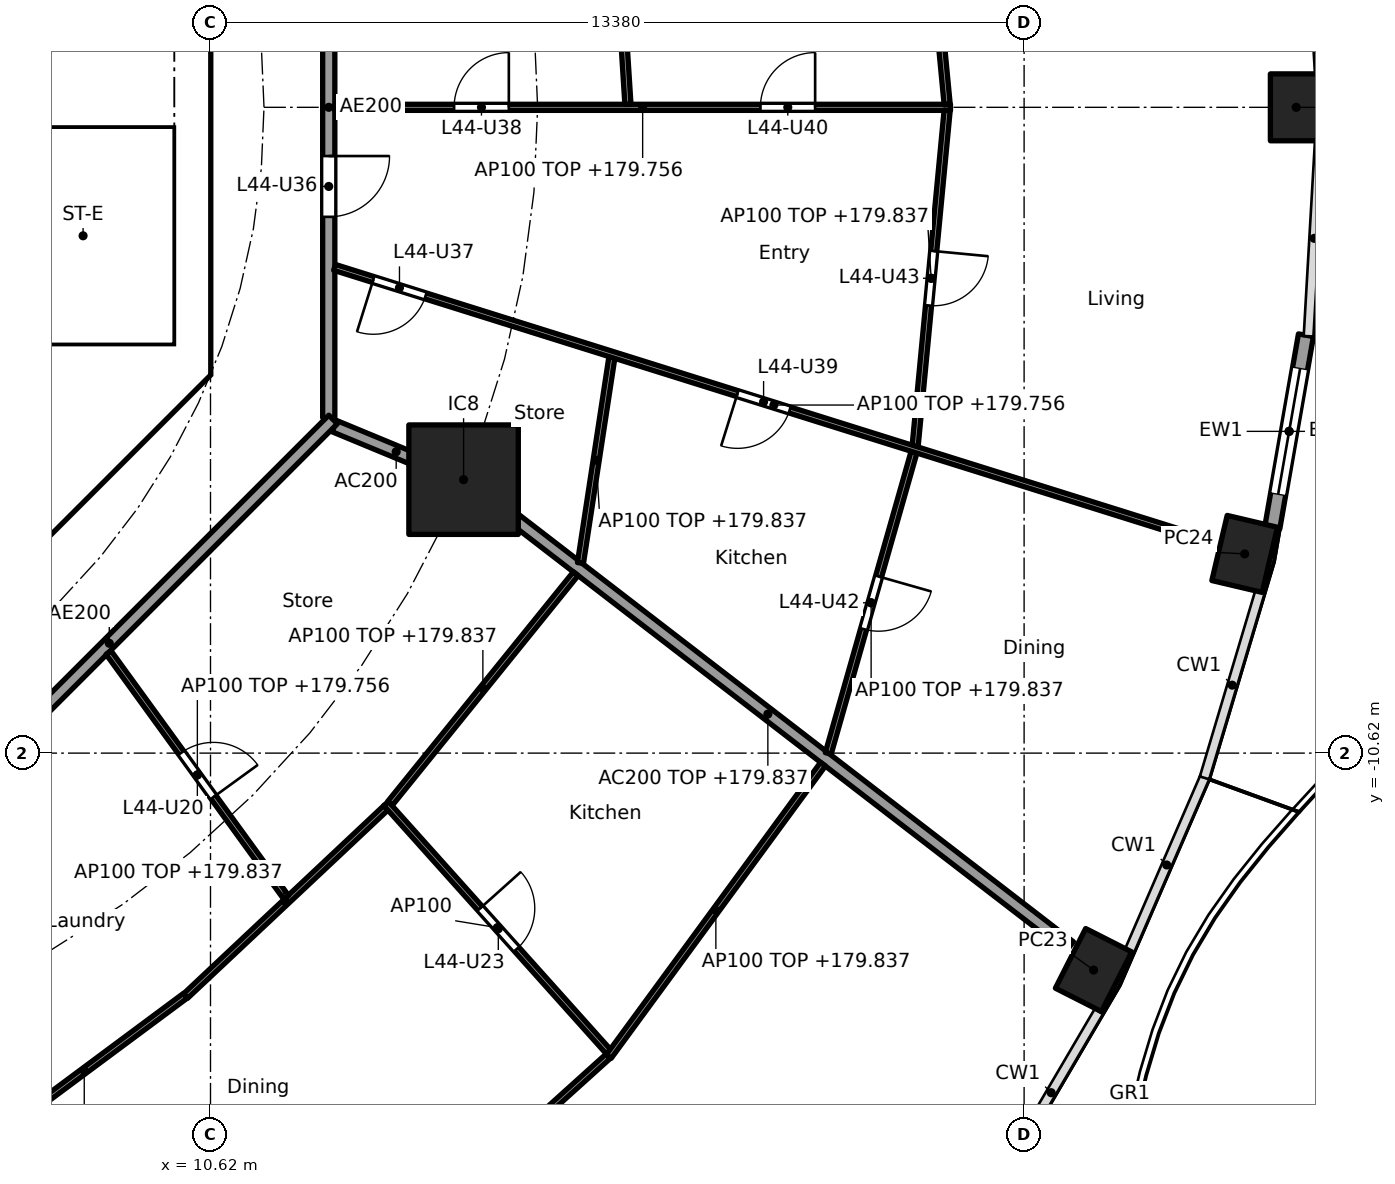
"""IFC4 building model, lengths in metres.
Left out: names, types, materials, properties, quantities, classifications, styles, units other than length and angle.
Written with IfcOpenShell. Run it as: python <this file> out.ifc"""

import sys

from ifc_helpers import new_model, si_unit, direction, frame, frame_2d, origin, origin_2d, place, context, subcontext, project, spatial, polyline, rectangle, hollow_rectangle, outline, extrude, element, fill, save


model = new_model("IFC4")
c1 = context("Model", 3, precision=1e-05, world=origin(), true_north=direction((0.0, 1.0)))
c2 = subcontext(c1, "Body", "Model", "MODEL_VIEW")
j1 = project(units=[si_unit("LENGTHUNIT", "METRE"), si_unit("PLANEANGLEUNIT", "RADIAN")], contexts=[c1])
p1 = place(None, origin())
s1 = spatial("IfcSite", under=j1, at=p1, CompositionType="ELEMENT")
p2 = place(p1, origin())
s2 = spatial("IfcBuilding", under=s1, at=p2, CompositionType="ELEMENT")
p3 = place(p2, frame((0.0, 0.0, 177.0)))
s3 = spatial("IfcBuildingStorey", under=s2, at=p3, CompositionType="ELEMENT", Elevation=177.0)
for number, where, z_axis, x_axis in (
    (1, (28.475, 0.0, 0.0), (0.0, 0.0, 1.0), (0.0, 1.0, 0.0)),
    (2, (25.142, -14.188, 0.0), (0.0, 0.0, 1.0), (0.452, 0.892, 0.0)),
    (3, (27.627, -7.344, 0.0), (0.0, 0.0, 1.0), (0.229, 0.973, 0.0)),
):
    element("IfcColumn", number, at=place(p3, frame(where, z_axis=z_axis, x_axis=x_axis)), inside=s3, PredefinedType="COLUMN", context=c2, shape_type="SweptSolid", body=[
        extrude(hollow_rectangle(XDim=1.1, YDim=0.85, WallThickness=0.036, at=origin_2d()), origin(), (0.0, 0.0, 1.0), 3.7),
    ])
p4 = place(p3, frame((14.782, -6.123, 0.0), z_axis=(0.0, 0.0, 1.0), x_axis=(1.0, 0.0, 0.0)))
e4 = element("IfcColumn", 4, at=p4, inside=s3, PredefinedType="COLUMN", context=c2, shape_type="SweptSolid", body=[
    extrude(rectangle(XDim=1.8, YDim=1.8, at=origin_2d()), origin(), (0.0, 0.0, 1.0), 3.7),
])
p5 = place(p3, frame((28.635, -3.747, 0.0), z_axis=(0.0, 0.0, 1.0), x_axis=(-0.172149769468, -0.985070787747, 0.0)))
e5 = element("IfcWall", 5, at=p5, inside=s3, PredefinedType="SOLIDWALL", context=c2, shape_type="SweptSolid", body=[
    extrude(rectangle(XDim=3.211, YDim=0.25, at=frame_2d((1.605, 0.0))), origin(), (0.0, 0.0, 1.0), 3.44),
])
p6 = place(p5, frame((0.555, 0.0, 0.0)))
e6 = element("IfcOpeningElement", 6, at=p6, cuts=e5, PredefinedType="OPENING", context=c2, shape_type="SweptSolid", body=[
    extrude(rectangle(XDim=2.1, YDim=2.4, at=frame_2d((1.05, 1.2))), frame((0.0, 0.135, 0.0), z_axis=(0.0, -1.0, 0.0), x_axis=(1.0, 0.0, 0.0)), (0.0, 0.0, 1.0), 0.27),
])
p7 = place(p3, frame((4.613, -9.988, 0.0), z_axis=(0.0, 0.0, 1.0), x_axis=(0.707106781187, 0.707106781187, 0.0)))
e7 = element("IfcWall", 7, at=p7, inside=s3, PredefinedType="SHEAR", context=c2, shape_type="SweptSolid", body=[
    extrude(rectangle(XDim=7.602, YDim=0.6, at=frame_2d((3.801, 0.0))), origin(), (0.0, 0.0, 1.0), 3.44),
])
p8 = place(p7, frame((3.201, 0.0, 0.0)))
e8 = element("IfcOpeningElement", 8, at=p8, cuts=e7, PredefinedType="OPENING", context=c2, shape_type="SweptSolid", body=[
    extrude(rectangle(XDim=1.2, YDim=2.1, at=frame_2d((0.6, 1.05))), frame((0.0, 0.31, 0.0), z_axis=(0.0, -1.0, 0.0), x_axis=(1.0, 0.0, 0.0)), (0.0, 0.0, 1.0), 0.62),
])
p9 = place(p3, origin())
e9 = element("IfcWall", 9, at=p9, inside=s3, PredefinedType="SHEAR", context=c2, shape_type="SweptSolid", body=[
    extrude(outline(polyline([(9.776, -4.401), (10.025, -4.152), (10.025, -3.801), (10.025, 4.152), (9.776, 4.401), (10.2, 4.825), (10.625, 4.401), (10.625, -4.401), (10.2, -4.825), (9.776, -4.401)])), origin(), (0.0, 0.0, 1.0), 3.44),
])
p10 = place(p3, origin())
e10 = element("IfcWall", 10, at=p10, inside=s3, PredefinedType="SOLIDWALL", context=c2, shape_type="SweptSolid", body=[
    extrude(outline(polyline([(10.025, -4.1), (6.7, -4.1), (6.7, -3.9), (10.025, -3.9), (10.025, -4.1)])), origin(), (0.0, 0.0, 1.0), 3.44),
])
p11 = place(p3, frame((12.657, -5.243, 0.0), z_axis=(0.0, 0.0, 1.0), x_axis=(0.92383017907, -0.382802560388, 0.0)))
e11 = element("IfcWall", 11, at=p11, inside=s3, PredefinedType="PARTITIONING", context=c2, shape_type="SweptSolid", body=[
    extrude(rectangle(XDim=2.2, YDim=0.2, at=frame_2d((1.1, 0.0))), origin(), (0.0, 0.0, 1.0), 3.44),
])
p12 = place(p3, frame((14.822, -6.154, 0.0), z_axis=(0.0, 0.0, 1.0), x_axis=(0.792203056092, -0.610257583254, 0.0)))
e12 = element("IfcWall", 12, at=p12, inside=s3, PredefinedType="PARTITIONING", context=c2, shape_type="SweptSolid", body=[
    extrude(rectangle(XDim=12.533, YDim=0.2, at=frame_2d((6.266, 0.0))), origin(), (0.0, 0.0, 1.0), 2.837),
])
p13 = place(p3, frame((12.565, -5.104, 0.0), z_axis=(0.0, 0.0, 1.0), x_axis=(0.0, 1.0, 0.0)))
e13 = element("IfcWall", 13, at=p13, inside=s3, PredefinedType="PARTITIONING", context=c2, shape_type="SweptSolid", body=[
    extrude(rectangle(XDim=10.209, YDim=0.2, at=frame_2d((5.104, 0.0))), origin(), (0.0, 0.0, 1.0), 3.44),
])
p14 = place(p13, frame((3.303, 0.0, 0.0)))
e14 = element("IfcOpeningElement", 14, at=p14, cuts=e13, PredefinedType="OPENING", context=c2, shape_type="SweptSolid", body=[
    extrude(rectangle(XDim=1.0, YDim=2.1, at=frame_2d((0.5, 1.05))), frame((0.0, 0.11, 0.0), z_axis=(0.0, -1.0, 0.0), x_axis=(1.0, 0.0, 0.0)), (0.0, 0.0, 1.0), 0.22),
])
p15 = place(p3, frame((5.275, -12.494, 0.0), z_axis=(0.0, 0.0, 1.0), x_axis=(0.707106781187, 0.707106781187, 0.0)))
e15 = element("IfcWall", 15, at=p15, inside=s3, PredefinedType="PARTITIONING", context=c2, shape_type="SweptSolid", body=[
    extrude(rectangle(XDim=10.409, YDim=0.2, at=frame_2d((5.205, 0.0))), origin(), (0.0, 0.0, 1.0), 3.44),
])
p16 = place(p3, frame((12.665, 0.0, 0.0), z_axis=(0.0, 0.0, 1.0), x_axis=(1.0, 0.0, 0.0)))
e16 = element("IfcWall", 16, at=p16, inside=s3, PredefinedType="PARTITIONING", context=c2, shape_type="SweptSolid", body=[
    extrude(rectangle(XDim=10.124, YDim=0.1, at=frame_2d((5.062, 0.0))), origin(), (0.0, 0.0, 1.0), 2.756),
])
p17 = place(p16, frame((1.961, 0.0, 0.0)))
e17 = element("IfcOpeningElement", 17, at=p17, cuts=e16, PredefinedType="OPENING", context=c2, shape_type="SweptSolid", body=[
    extrude(rectangle(XDim=0.9, YDim=2.1, at=frame_2d((0.45, 1.05))), frame((0.0, 0.06, 0.0), z_axis=(0.0, -1.0, 0.0), x_axis=(1.0, 0.0, 0.0)), (0.0, 0.0, 1.0), 0.12),
])
p18 = place(p16, frame((6.999, 0.0, 0.0)))
e18 = element("IfcOpeningElement", 18, at=p18, cuts=e16, PredefinedType="OPENING", context=c2, shape_type="SweptSolid", body=[
    extrude(rectangle(XDim=0.9, YDim=2.1, at=frame_2d((0.45, 1.05))), frame((0.0, 0.06, 0.0), z_axis=(0.0, -1.0, 0.0), x_axis=(1.0, 0.0, 0.0)), (0.0, 0.0, 1.0), 0.12),
])
p19 = place(p3, frame((17.485, 0.05, 0.0), z_axis=(0.0, 0.0, 1.0), x_axis=(-0.063673473968, 0.997970785501, 0.0)))
e19 = element("IfcWall", 19, at=p19, inside=s3, PredefinedType="PARTITIONING", context=c2, shape_type="SweptSolid", body=[
    extrude(rectangle(XDim=4.072, YDim=0.1, at=frame_2d((2.036, 0.0))), origin(), (0.0, 0.0, 1.0), 2.837),
])
p20 = place(p19, frame((2.554, 0.0, 0.0)))
e20 = element("IfcOpeningElement", 20, at=p20, cuts=e19, PredefinedType="OPENING", context=c2, shape_type="SweptSolid", body=[
    extrude(rectangle(XDim=0.9, YDim=2.1, at=frame_2d((0.45, 1.05))), frame((0.0, 0.06, 0.0), z_axis=(0.0, -1.0, 0.0), x_axis=(1.0, 0.0, 0.0)), (0.0, 0.0, 1.0), 0.12),
])
p21 = place(p3, frame((22.734, 0.05, 0.0), z_axis=(0.0, 0.0, 1.0), x_axis=(-0.0949274088, 0.995484197292, 0.0)))
e21 = element("IfcWall", 21, at=p21, inside=s3, PredefinedType="PARTITIONING", context=c2, shape_type="SweptSolid", body=[
    extrude(rectangle(XDim=5.648, YDim=0.1, at=frame_2d((2.824, 0.0))), origin(), (0.0, 0.0, 1.0), 2.837),
])
p22 = place(p3, frame((22.734, -0.05, 0.0), z_axis=(0.0, 0.0, 1.0), x_axis=(-0.094923312677, -0.995484587882, 0.0)))
e22 = element("IfcWall", 22, at=p22, inside=s3, PredefinedType="PARTITIONING", context=c2, shape_type="SweptSolid", body=[
    extrude(rectangle(XDim=5.548, YDim=0.1, at=frame_2d((2.774, 0.0))), origin(), (0.0, 0.0, 1.0), 2.837),
])
p23 = place(p22, frame((2.324, 0.0, 0.0)))
e23 = element("IfcOpeningElement", 23, at=p23, cuts=e22, PredefinedType="OPENING", context=c2, shape_type="SweptSolid", body=[
    extrude(rectangle(XDim=0.9, YDim=2.1, at=frame_2d((0.45, 1.05))), frame((0.0, 0.06, 0.0), z_axis=(0.0, -1.0, 0.0), x_axis=(1.0, 0.0, 0.0)), (0.0, 0.0, 1.0), 0.12),
])
p24 = place(p3, frame((6.138, -14.83, 0.0), z_axis=(0.0, 0.0, 1.0), x_axis=(0.294822274121, -0.955552105687, 0.0)))
e24 = element("IfcWall", 24, at=p24, inside=s3, PredefinedType="PARTITIONING", context=c2, shape_type="SweptSolid", body=[
    extrude(rectangle(XDim=7.594, YDim=0.1, at=frame_2d((3.797, 0.0))), origin(), (0.0, 0.0, 1.0), 3.44),
])
p25 = place(p24, frame((1.306, 0.0, 0.0)))
e25 = element("IfcOpeningElement", 25, at=p25, cuts=e24, PredefinedType="OPENING", context=c2, shape_type="SweptSolid", body=[
    extrude(rectangle(XDim=0.9, YDim=2.1, at=frame_2d((0.45, 1.05))), frame((0.0, 0.06, 0.0), z_axis=(0.0, -1.0, 0.0), x_axis=(1.0, 0.0, 0.0)), (0.0, 0.0, 1.0), 0.12),
])
p26 = place(p24, frame((4.515, 0.0, 0.0)))
e26 = element("IfcOpeningElement", 26, at=p26, cuts=e24, PredefinedType="OPENING", context=c2, shape_type="SweptSolid", body=[
    extrude(rectangle(XDim=0.9, YDim=2.1, at=frame_2d((0.45, 1.05))), frame((0.0, 0.06, 0.0), z_axis=(0.0, -1.0, 0.0), x_axis=(1.0, 0.0, 0.0)), (0.0, 0.0, 1.0), 0.12),
])
p27 = place(p3, frame((6.881, -17.08, 0.0), z_axis=(0.0, 0.0, 1.0), x_axis=(0.802784956441, 0.596268659005, 0.0)))
e27 = element("IfcWall", 27, at=p27, inside=s3, PredefinedType="PARTITIONING", context=c2, shape_type="SweptSolid", body=[
    extrude(rectangle(XDim=4.142, YDim=0.1, at=frame_2d((2.071, 0.0))), origin(), (0.0, 0.0, 1.0), 2.837),
])
p28 = place(p3, frame((10.21, -14.614, 0.0), z_axis=(0.0, 0.0, 1.0), x_axis=(0.728883199496, 0.684638066055, 0.0)))
e28 = element("IfcWall", 28, at=p28, inside=s3, PredefinedType="PARTITIONING", context=c2, shape_type="SweptSolid", body=[
    extrude(rectangle(XDim=4.519, YDim=0.1, at=frame_2d((2.26, 0.0))), origin(), (0.0, 0.0, 1.0), 2.837),
])
p29 = place(p3, frame((13.045, -19.313, 0.0), z_axis=(0.0, 0.0, 1.0), x_axis=(0.742790086539, 0.66952437397, 0.0)))
e29 = element("IfcWall", 29, at=p29, inside=s3, PredefinedType="PARTITIONING", context=c2, shape_type="SweptSolid", body=[
    extrude(rectangle(XDim=5.542, YDim=0.1, at=frame_2d((2.771, 0.0))), origin(), (0.0, 0.0, 1.0), 2.837),
])
p30 = place(p29, frame((2.321, 0.0, 0.0)))
e30 = element("IfcOpeningElement", 30, at=p30, cuts=e29, PredefinedType="OPENING", context=c2, shape_type="SweptSolid", body=[
    extrude(rectangle(XDim=0.9, YDim=2.1, at=frame_2d((0.45, 1.05))), frame((0.0, 0.06, 0.0), z_axis=(0.0, -1.0, 0.0), x_axis=(1.0, 0.0, 0.0)), (0.0, 0.0, 1.0), 0.12),
])
p31 = place(p3, frame((8.943, -8.966, 0.0), z_axis=(0.0, 0.0, 1.0), x_axis=(0.587187896734, -0.809450661825, 0.0)))
e31 = element("IfcWall", 31, at=p31, inside=s3, PredefinedType="PARTITIONING", context=c2, shape_type="SweptSolid", body=[
    extrude(rectangle(XDim=4.975, YDim=0.1, at=frame_2d((2.487, 0.0))), origin(), (0.0, 0.0, 1.0), 2.756),
])
p32 = place(p31, frame((2.037, 0.0, 0.0)))
e32 = element("IfcOpeningElement", 32, at=p32, cuts=e31, PredefinedType="OPENING", context=c2, shape_type="SweptSolid", body=[
    extrude(rectangle(XDim=0.9, YDim=2.1, at=frame_2d((0.45, 1.05))), frame((0.0, 0.06, 0.0), z_axis=(0.0, -1.0, 0.0), x_axis=(1.0, 0.0, 0.0)), (0.0, 0.0, 1.0), 0.12),
])
p33 = place(p3, frame((13.507, -11.449, 0.0), z_axis=(0.0, 0.0, 1.0), x_axis=(0.667299792168, -0.744789223453, 0.0)))
e33 = element("IfcWall", 33, at=p33, inside=s3, PredefinedType="PARTITIONING", context=c2, shape_type="SweptSolid", body=[
    extrude(rectangle(XDim=5.482, YDim=0.1, at=frame_2d((2.741, 0.0))), origin(), (0.0, 0.0, 1.0), 3.44),
])
p34 = place(p33, frame((2.316, 0.0, 0.0)))
e34 = element("IfcOpeningElement", 34, at=p34, cuts=e33, PredefinedType="OPENING", context=c2, shape_type="SweptSolid", body=[
    extrude(rectangle(XDim=0.9, YDim=2.1, at=frame_2d((0.45, 1.05))), frame((0.0, 0.06, 0.0), z_axis=(0.0, -1.0, 0.0), x_axis=(1.0, 0.0, 0.0)), (0.0, 0.0, 1.0), 0.12),
])
p35 = place(p3, frame((13.572, -11.447, 0.0), z_axis=(0.0, 0.0, 1.0), x_axis=(0.628738316533, 0.777616955399, 0.0)))
e35 = element("IfcWall", 35, at=p35, inside=s3, PredefinedType="PARTITIONING", context=c2, shape_type="SweptSolid", body=[
    extrude(rectangle(XDim=4.857, YDim=0.1, at=frame_2d((2.429, 0.0))), origin(), (0.0, 0.0, 1.0), 2.837),
])
p36 = place(p3, frame((17.169, -15.609, 0.0), z_axis=(0.0, 0.0, 1.0), x_axis=(0.591122127251, 0.806582066918, 0.0)))
e36 = element("IfcWall", 36, at=p36, inside=s3, PredefinedType="PARTITIONING", context=c2, shape_type="SweptSolid", body=[
    extrude(rectangle(XDim=5.96, YDim=0.1, at=frame_2d((2.98, 0.0))), origin(), (0.0, 0.0, 1.0), 2.837),
])
p37 = place(p3, frame((16.704, -7.493, 0.0), z_axis=(0.0, 0.0, 1.0), x_axis=(0.1510806336, 0.988521442434, 0.0)))
e37 = element("IfcWall", 37, at=p37, inside=s3, PredefinedType="PARTITIONING", context=c2, shape_type="SweptSolid", body=[
    extrude(rectangle(XDim=3.419, YDim=0.1, at=frame_2d((1.71, 0.0))), origin(), (0.0, 0.0, 1.0), 2.837),
])
p38 = place(p3, frame((20.779, -10.625, 0.0), z_axis=(0.0, 0.0, 1.0), x_axis=(0.273819702124, 0.961781040949, 0.0)))
e38 = element("IfcWall", 38, at=p38, inside=s3, PredefinedType="PARTITIONING", context=c2, shape_type="SweptSolid", body=[
    extrude(rectangle(XDim=5.152, YDim=0.1, at=frame_2d((2.576, 0.0))), origin(), (0.0, 0.0, 1.0), 2.837),
])
p39 = place(p38, frame((2.126, 0.0, 0.0)))
e39 = element("IfcOpeningElement", 39, at=p39, cuts=e38, PredefinedType="OPENING", context=c2, shape_type="SweptSolid", body=[
    extrude(rectangle(XDim=0.9, YDim=2.1, at=frame_2d((0.45, 1.05))), frame((0.0, 0.06, 0.0), z_axis=(0.0, -1.0, 0.0), x_axis=(1.0, 0.0, 0.0)), (0.0, 0.0, 1.0), 0.12),
])
p40 = place(p3, frame((12.66, -2.632, 0.0), z_axis=(0.0, 0.0, 1.0), x_axis=(0.954248738607, -0.299013954302, 0.0)))
e40 = element("IfcWall", 40, at=p40, inside=s3, PredefinedType="PARTITIONING", context=c2, shape_type="SweptSolid", body=[
    extrude(rectangle(XDim=15.142, YDim=0.1, at=frame_2d((7.571, 0.0))), origin(), (0.0, 0.0, 1.0), 2.756),
])
p41 = place(p40, frame((0.669, 0.0, 0.0)))
e41 = element("IfcOpeningElement", 41, at=p41, cuts=e40, PredefinedType="OPENING", context=c2, shape_type="SweptSolid", body=[
    extrude(rectangle(XDim=0.9, YDim=2.1, at=frame_2d((0.45, 1.05))), frame((0.0, 0.06, 0.0), z_axis=(0.0, -1.0, 0.0), x_axis=(1.0, 0.0, 0.0)), (0.0, 0.0, 1.0), 0.12),
])
p42 = place(p40, frame((6.944, 0.0, 0.0)))
e42 = element("IfcOpeningElement", 42, at=p42, cuts=e40, PredefinedType="OPENING", context=c2, shape_type="SweptSolid", body=[
    extrude(rectangle(XDim=0.9, YDim=2.1, at=frame_2d((0.45, 1.05))), frame((0.0, 0.06, 0.0), z_axis=(0.0, -1.0, 0.0), x_axis=(1.0, 0.0, 0.0)), (0.0, 0.0, 1.0), 0.12),
])
p43 = place(p6, origin())
e43 = element("IfcDoor", 43, at=p43, inside=s3, OperationType="SLIDING_TO_LEFT", PredefinedType="DOOR", context=c2, shape_type="SweptSolid", body=[
    extrude(rectangle(XDim=2.1, YDim=2.4, at=frame_2d((1.05, 1.2))), frame((0.0, 0.025, 0.0), z_axis=(0.0, -1.0, 0.0), x_axis=(1.0, 0.0, 0.0)), (0.0, 0.0, 1.0), 0.05),
])
fill(e6, e43)
p44 = place(p32, origin())
e44 = element("IfcDoor", 44, at=p44, inside=s3, OperationType="SINGLE_SWING_RIGHT", PredefinedType="DOOR", context=c2, shape_type="SweptSolid", body=[
    extrude(rectangle(XDim=0.9, YDim=2.1, at=frame_2d((0.45, 1.05))), frame((0.0, 0.025, 0.0), z_axis=(0.0, -1.0, 0.0), x_axis=(1.0, 0.0, 0.0)), (0.0, 0.0, 1.0), 0.05),
])
fill(e32, e44)
p45 = place(p34, origin())
e45 = element("IfcDoor", 45, at=p45, inside=s3, OperationType="SINGLE_SWING_LEFT", PredefinedType="DOOR", context=c2, shape_type="SweptSolid", body=[
    extrude(rectangle(XDim=0.9, YDim=2.1, at=frame_2d((0.45, 1.05))), frame((0.0, 0.025, 0.0), z_axis=(0.0, -1.0, 0.0), x_axis=(1.0, 0.0, 0.0)), (0.0, 0.0, 1.0), 0.05),
])
fill(e34, e45)
p46 = place(p14, frame((1.0, 0.0, 0.0), x_axis=(-1.0, 0.0, 0.0)))
e46 = element("IfcDoor", 46, at=p46, inside=s3, OperationType="SINGLE_SWING_LEFT", PredefinedType="DOOR", context=c2, shape_type="SweptSolid", body=[
    extrude(rectangle(XDim=1.0, YDim=2.1, at=frame_2d((0.5, 1.05))), frame((0.0, 0.025, 0.0), z_axis=(0.0, -1.0, 0.0), x_axis=(1.0, 0.0, 0.0)), (0.0, 0.0, 1.0), 0.05),
])
fill(e14, e46)
p47 = place(p41, frame((0.9, 0.0, 0.0), x_axis=(-1.0, 0.0, 0.0)))
e47 = element("IfcDoor", 47, at=p47, inside=s3, OperationType="SINGLE_SWING_RIGHT", PredefinedType="DOOR", context=c2, shape_type="SweptSolid", body=[
    extrude(rectangle(XDim=0.9, YDim=2.1, at=frame_2d((0.45, 1.05))), frame((0.0, 0.025, 0.0), z_axis=(0.0, -1.0, 0.0), x_axis=(1.0, 0.0, 0.0)), (0.0, 0.0, 1.0), 0.05),
])
fill(e41, e47)
p48 = place(p17, origin())
e48 = element("IfcDoor", 48, at=p48, inside=s3, OperationType="SINGLE_SWING_RIGHT", PredefinedType="DOOR", context=c2, shape_type="SweptSolid", body=[
    extrude(rectangle(XDim=0.9, YDim=2.1, at=frame_2d((0.45, 1.05))), frame((0.0, 0.025, 0.0), z_axis=(0.0, -1.0, 0.0), x_axis=(1.0, 0.0, 0.0)), (0.0, 0.0, 1.0), 0.05),
])
fill(e17, e48)
p49 = place(p42, frame((0.9, 0.0, 0.0), x_axis=(-1.0, 0.0, 0.0)))
e49 = element("IfcDoor", 49, at=p49, inside=s3, OperationType="SINGLE_SWING_RIGHT", PredefinedType="DOOR", context=c2, shape_type="SweptSolid", body=[
    extrude(rectangle(XDim=0.9, YDim=2.1, at=frame_2d((0.45, 1.05))), frame((0.0, 0.025, 0.0), z_axis=(0.0, -1.0, 0.0), x_axis=(1.0, 0.0, 0.0)), (0.0, 0.0, 1.0), 0.05),
])
fill(e42, e49)
p50 = place(p18, origin())
e50 = element("IfcDoor", 50, at=p50, inside=s3, OperationType="SINGLE_SWING_RIGHT", PredefinedType="DOOR", context=c2, shape_type="SweptSolid", body=[
    extrude(rectangle(XDim=0.9, YDim=2.1, at=frame_2d((0.45, 1.05))), frame((0.0, 0.025, 0.0), z_axis=(0.0, -1.0, 0.0), x_axis=(1.0, 0.0, 0.0)), (0.0, 0.0, 1.0), 0.05),
])
fill(e18, e50)
p51 = place(p39, frame((0.9, 0.0, 0.0), x_axis=(-1.0, 0.0, 0.0)))
e51 = element("IfcDoor", 51, at=p51, inside=s3, OperationType="SINGLE_SWING_LEFT", PredefinedType="DOOR", context=c2, shape_type="SweptSolid", body=[
    extrude(rectangle(XDim=0.9, YDim=2.1, at=frame_2d((0.45, 1.05))), frame((0.0, 0.025, 0.0), z_axis=(0.0, -1.0, 0.0), x_axis=(1.0, 0.0, 0.0)), (0.0, 0.0, 1.0), 0.05),
])
fill(e39, e51)
p52 = place(p23, origin())
e52 = element("IfcDoor", 52, at=p52, inside=s3, OperationType="SINGLE_SWING_LEFT", PredefinedType="DOOR", context=c2, shape_type="SweptSolid", body=[
    extrude(rectangle(XDim=0.9, YDim=2.1, at=frame_2d((0.45, 1.05))), frame((0.0, 0.025, 0.0), z_axis=(0.0, -1.0, 0.0), x_axis=(1.0, 0.0, 0.0)), (0.0, 0.0, 1.0), 0.05),
])
fill(e23, e52)
save(model, sys.argv[1])
